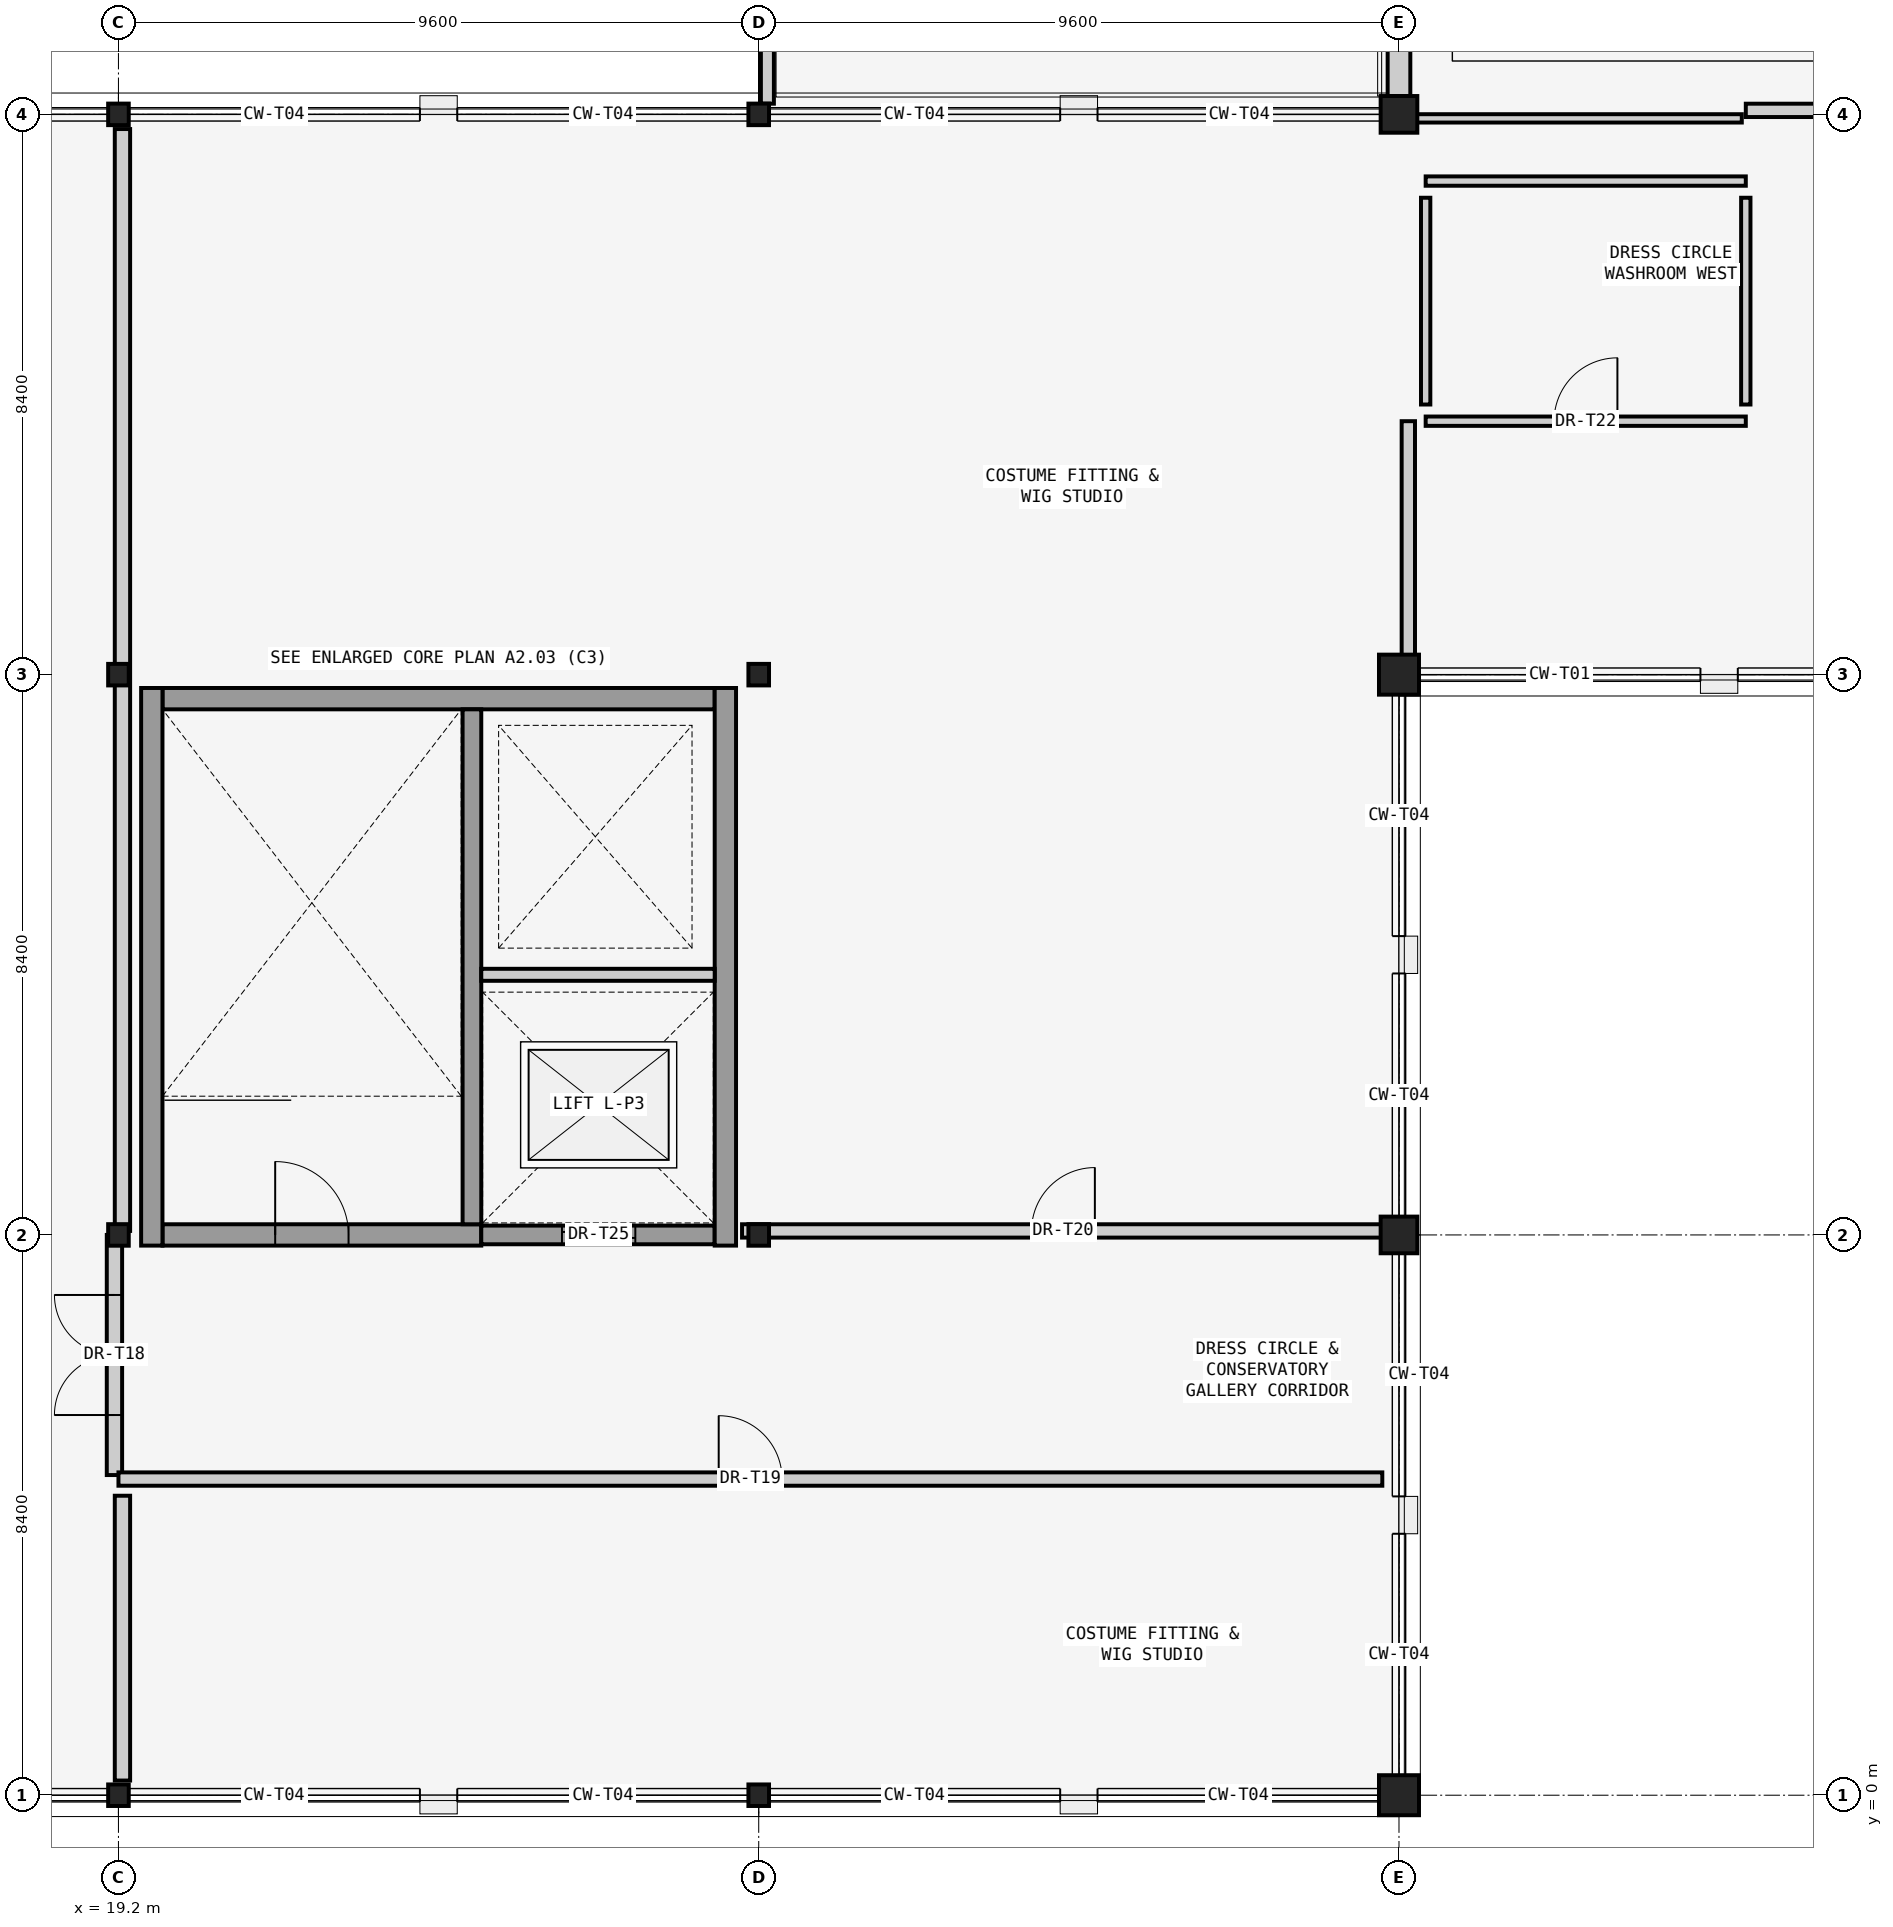
"""IFC4 building model, lengths in metres.
Left out: names, types, materials, properties, quantities, classifications, styles, units other than length and angle.
Written with IfcOpenShell. Run it as: python <this file> out.ifc"""

import sys

from ifc_helpers import new_model, si_unit, direction, frame, frame_2d, origin, origin_2d, place, context, subcontext, project, spatial, rectangle, i_section, extrude, element, fill, save


model = new_model("IFC4")
c1 = context("Model", 3, precision=1e-05, world=origin(), true_north=direction((0.0, 1.0)))
c2 = subcontext(c1, "Body", "Model", "MODEL_VIEW")
j1 = project(units=[si_unit("LENGTHUNIT", "METRE"), si_unit("PLANEANGLEUNIT", "RADIAN")], contexts=[c1])
p1 = place(None, origin())
s1 = spatial("IfcSite", under=j1, at=p1, CompositionType="ELEMENT")
p2 = place(p1, origin())
s2 = spatial("IfcBuilding", under=s1, at=p2, CompositionType="ELEMENT")
p3 = place(p2, frame((0.0, 0.0, 10.2)))
s3 = spatial("IfcBuildingStorey", under=s2, at=p3, CompositionType="ELEMENT", Elevation=10.2)
for number, where, z_axis, x_axis in (
    (1, (19.2, 0.0, 0.0), (0.0, 0.0, 1.0), (1.0, 0.0, 0.0)),
    (2, (19.2, 8.4, 0.0), (0.0, 0.0, 1.0), (1.0, 0.0, 0.0)),
):
    element("IfcColumn", number, at=place(p3, frame(where, z_axis=z_axis, x_axis=x_axis)), inside=s3, PredefinedType="COLUMN", context=c2, shape_type="SweptSolid", body=[
        extrude(i_section(OverallWidth=0.309, OverallDepth=0.323, WebThickness=0.014, FlangeThickness=0.023, at=origin_2d()), origin(), (0.0, 0.0, 1.0), 4.62),
    ])
for number, where, z_axis, x_axis in (
    (3, (19.2, 16.8, 0.0), (0.0, 0.0, 1.0), (1.0, 0.0, 0.0)),
    (4, (19.2, 25.2, 0.0), (0.0, 0.0, 1.0), (1.0, 0.0, 0.0)),
):
    element("IfcColumn", number, at=place(p3, frame(where, z_axis=z_axis, x_axis=x_axis)), inside=s3, PredefinedType="COLUMN", context=c2, shape_type="SweptSolid", body=[
        extrude(i_section(OverallWidth=0.309, OverallDepth=0.323, WebThickness=0.014, FlangeThickness=0.023, at=origin_2d()), origin(), (0.0, 0.0, 1.0), 4.53),
    ])
for number, where, z_axis, x_axis in (
    (5, (28.8, 0.0, 0.0), (0.0, 0.0, 1.0), (1.0, 0.0, 0.0)),
    (6, (28.8, 8.4, 0.0), (0.0, 0.0, 1.0), (1.0, 0.0, 0.0)),
):
    element("IfcColumn", number, at=place(p3, frame(where, z_axis=z_axis, x_axis=x_axis)), inside=s3, PredefinedType="COLUMN", context=c2, shape_type="SweptSolid", body=[
        extrude(i_section(OverallWidth=0.309, OverallDepth=0.323, WebThickness=0.014, FlangeThickness=0.023, at=origin_2d()), origin(), (0.0, 0.0, 1.0), 4.62),
    ])
for number, where, z_axis, x_axis in (
    (7, (28.8, 16.8, 0.0), (0.0, 0.0, 1.0), (1.0, 0.0, 0.0)),
    (8, (28.8, 25.2, 0.0), (0.0, 0.0, 1.0), (1.0, 0.0, 0.0)),
):
    element("IfcColumn", number, at=place(p3, frame(where, z_axis=z_axis, x_axis=x_axis)), inside=s3, PredefinedType="COLUMN", context=c2, shape_type="SweptSolid", body=[
        extrude(i_section(OverallWidth=0.309, OverallDepth=0.323, WebThickness=0.014, FlangeThickness=0.023, at=origin_2d()), origin(), (0.0, 0.0, 1.0), 4.53),
    ])
p4 = place(p3, frame((38.4, 0.0, 0.0), z_axis=(0.0, 0.0, 1.0), x_axis=(1.0, 0.0, 0.0)))
e9 = element("IfcColumn", 9, at=p4, inside=s3, PredefinedType="COLUMN", context=c2, shape_type="SweptSolid", body=[
    extrude(rectangle(XDim=0.6, YDim=0.6, at=origin_2d()), origin(), (0.0, 0.0, 1.0), 4.62),
])
p5 = place(p3, frame((38.4, 8.4, 0.0), z_axis=(0.0, 0.0, 1.0), x_axis=(1.0, 0.0, 0.0)))
e10 = element("IfcColumn", 10, at=p5, inside=s3, PredefinedType="COLUMN", context=c2, shape_type="SweptSolid", body=[
    extrude(rectangle(XDim=0.55, YDim=0.55, at=origin_2d()), origin(), (0.0, 0.0, 1.0), 4.62),
])
p6 = place(p3, frame((38.4, 16.8, 0.0), z_axis=(0.0, 0.0, 1.0), x_axis=(1.0, 0.0, 0.0)))
e11 = element("IfcColumn", 11, at=p6, inside=s3, PredefinedType="COLUMN", context=c2, shape_type="SweptSolid", body=[
    extrude(rectangle(XDim=0.6, YDim=0.6, at=origin_2d()), origin(), (0.0, 0.0, 1.0), 4.53),
])
p7 = place(p3, frame((38.4, 25.2, 0.0), z_axis=(0.0, 0.0, 1.0), x_axis=(1.0, 0.0, 0.0)))
e12 = element("IfcColumn", 12, at=p7, inside=s3, PredefinedType="COLUMN", context=c2, shape_type="SweptSolid", body=[
    extrude(rectangle(XDim=0.55, YDim=0.55, at=origin_2d()), origin(), (0.0, 0.0, 1.0), 4.53),
])
p8 = place(p3, frame((38.4, 25.475, 0.0), z_axis=(0.0, 0.0, 1.0), x_axis=(0.0, 1.0, 0.0)))
e13 = element("IfcWall", 13, at=p8, inside=s3, PredefinedType="SOLIDWALL", context=c2, shape_type="SweptSolid", body=[
    extrude(rectangle(XDim=7.825, YDim=0.34, at=frame_2d((3.913, 0.0))), origin(), (0.0, 0.0, 1.0), 4.54),
])
p9 = place(p8, frame((1.216, 0.0, 0.85)))
e14 = element("IfcOpeningElement", 14, at=p9, cuts=e13, PredefinedType="OPENING", context=c2, shape_type="SweptSolid", body=[
    extrude(rectangle(XDim=1.95, YDim=2.5, at=frame_2d((0.975, 1.25))), frame((0.0, 0.18, 0.0), z_axis=(0.0, -1.0, 0.0), x_axis=(1.0, 0.0, 0.0)), (0.0, 0.0, 1.0), 0.36),
])
p10 = place(p3, frame((28.93, 25.36, 0.0), z_axis=(0.0, 0.0, 1.0), x_axis=(0.0, 1.0, 0.0)))
e15 = element("IfcWall", 15, at=p10, inside=s3, PredefinedType="PARAPET", context=c2, shape_type="SweptSolid", body=[
    extrude(rectangle(XDim=8.08, YDim=0.195, at=frame_2d((4.04, 0.0))), origin(), (0.0, 0.0, 1.0), 1.15),
])
p11 = place(p3, frame((19.86, 8.4, 0.0), z_axis=(0.0, 0.0, 1.0), x_axis=(1.0, 0.0, 0.0)))
e16 = element("IfcWall", 16, at=p11, inside=s3, PredefinedType="SHEAR", context=c2, shape_type="SweptSolid", body=[
    extrude(rectangle(XDim=4.78, YDim=0.32, at=frame_2d((2.39, 0.0))), origin(), (0.0, 0.0, 1.0), 4.54),
])
p12 = place(p11, frame((1.69, 0.0, 0.0)))
e17 = element("IfcOpeningElement", 17, at=p12, cuts=e16, PredefinedType="OPENING", context=c2, shape_type="SweptSolid", body=[
    extrude(rectangle(XDim=1.1, YDim=2.2, at=frame_2d((0.55, 1.1))), frame((0.0, 0.17, 0.0), z_axis=(0.0, -1.0, 0.0), x_axis=(1.0, 0.0, 0.0)), (0.0, 0.0, 1.0), 0.34),
])
p13 = place(p3, frame((24.64, 8.4, 0.0), z_axis=(0.0, 0.0, 1.0), x_axis=(1.0, 0.0, 0.0)))
e18 = element("IfcWall", 18, at=p13, inside=s3, PredefinedType="SHEAR", context=c2, shape_type="SweptSolid", body=[
    extrude(rectangle(XDim=3.5, YDim=0.28, at=frame_2d((1.75, 0.0))), origin(), (0.0, 0.0, 1.0), 4.54),
])
p14 = place(p13, frame((1.21, 0.0, 0.0)))
e19 = element("IfcOpeningElement", 19, at=p14, cuts=e18, PredefinedType="OPENING", context=c2, shape_type="SweptSolid", body=[
    extrude(rectangle(XDim=1.1, YDim=2.2, at=frame_2d((0.55, 1.1))), frame((0.0, 0.15, 0.0), z_axis=(0.0, -1.0, 0.0), x_axis=(1.0, 0.0, 0.0)), (0.0, 0.0, 1.0), 0.3),
])
p15 = place(p3, frame((28.14, 16.44, 0.0), z_axis=(0.0, 0.0, 1.0), x_axis=(-1.0, 0.0, 0.0)))
e20 = element("IfcWall", 20, at=p15, inside=s3, PredefinedType="SHEAR", context=c2, shape_type="SweptSolid", body=[
    extrude(rectangle(XDim=8.28, YDim=0.32, at=frame_2d((4.14, 0.0))), origin(), (0.0, 0.0, 1.0), 4.54),
])
for number, where, z_axis, x_axis in (
    (21, (19.7, 16.6, 0.0), (0.0, 0.0, 1.0), (0.0, -1.0, 0.0)),
    (22, (28.3, 8.24, 0.0), (0.0, 0.0, 1.0), (0.0, 1.0, 0.0)),
):
    element("IfcWall", number, at=place(p3, frame(where, z_axis=z_axis, x_axis=x_axis)), inside=s3, PredefinedType="SHEAR", context=c2, shape_type="SweptSolid", body=[
        extrude(rectangle(XDim=8.36, YDim=0.32, at=frame_2d((4.18, 0.0))), origin(), (0.0, 0.0, 1.0), 4.54),
    ])
p16 = place(p3, frame((24.5, 8.56, 0.0), z_axis=(0.0, 0.0, 1.0), x_axis=(0.0, 1.0, 0.0)))
e23 = element("IfcWall", 23, at=p16, inside=s3, PredefinedType="SHEAR", context=c2, shape_type="SweptSolid", body=[
    extrude(rectangle(XDim=7.72, YDim=0.28, at=frame_2d((3.86, 0.0))), origin(), (0.0, 0.0, 1.0), 4.54),
])
p17 = place(p3, frame((24.64, 12.3, 0.0), z_axis=(0.0, 0.0, 1.0), x_axis=(1.0, 0.0, 0.0)))
e24 = element("IfcWall", 24, at=p17, inside=s3, PredefinedType="SOLIDWALL", context=c2, shape_type="SweptSolid", body=[
    extrude(rectangle(XDim=3.5, YDim=0.18, at=frame_2d((1.75, 0.0))), origin(), (0.0, 0.0, 1.0), 4.54),
])
p18 = place(p3, frame((38.8, 20.6, 0.0), z_axis=(0.0, 0.0, 1.0), x_axis=(1.0, 0.0, 0.0)))
e25 = element("IfcWall", 25, at=p18, inside=s3, PredefinedType="PARTITIONING", context=c2, shape_type="SweptSolid", body=[
    extrude(rectangle(XDim=4.8, YDim=0.14, at=frame_2d((2.4, 0.0))), origin(), (0.0, 0.0, 1.0), 4.32),
])
p19 = place(p18, frame((1.925, 0.0, 0.0)))
e26 = element("IfcOpeningElement", 26, at=p19, cuts=e25, PredefinedType="OPENING", context=c2, shape_type="SweptSolid", body=[
    extrude(rectangle(XDim=0.95, YDim=2.15, at=frame_2d((0.475, 1.075))), frame((0.0, 0.08, 0.0), z_axis=(0.0, -1.0, 0.0), x_axis=(1.0, 0.0, 0.0)), (0.0, 0.0, 1.0), 0.16),
])
p20 = place(p3, frame((38.8, 24.2, 0.0), z_axis=(0.0, 0.0, 1.0), x_axis=(1.0, 0.0, 0.0)))
e27 = element("IfcWall", 27, at=p20, inside=s3, PredefinedType="PARTITIONING", context=c2, shape_type="SweptSolid", body=[
    extrude(rectangle(XDim=4.8, YDim=0.14, at=frame_2d((2.4, 0.0))), origin(), (0.0, 0.0, 1.0), 4.32),
])
for number, where, z_axis, x_axis in (
    (28, (38.8, 20.85, 0.0), (0.0, 0.0, 1.0), (0.0, 1.0, 0.0)),
    (29, (43.6, 20.85, 0.0), (0.0, 0.0, 1.0), (0.0, 1.0, 0.0)),
):
    element("IfcWall", number, at=place(p3, frame(where, z_axis=z_axis, x_axis=x_axis)), inside=s3, PredefinedType="PARTITIONING", context=c2, shape_type="SweptSolid", body=[
        extrude(rectangle(XDim=3.1, YDim=0.14, at=frame_2d((1.55, 0.0))), origin(), (0.0, 0.0, 1.0), 4.32),
    ])
p21 = place(p3, frame((19.14, 4.8, 0.0), z_axis=(0.0, 0.0, 1.0), x_axis=(0.0, 1.0, 0.0)))
e30 = element("IfcWall", 30, at=p21, inside=s3, PredefinedType="SOLIDWALL", context=c2, shape_type="SweptSolid", body=[
    extrude(rectangle(XDim=3.6, YDim=0.23, at=frame_2d((1.8, 0.0))), origin(), (0.0, 0.0, 1.0), 4.3),
])
p22 = place(p21, frame((0.9, 0.0, 0.0)))
e31 = element("IfcOpeningElement", 31, at=p22, cuts=e30, PredefinedType="OPENING", context=c2, shape_type="SweptSolid", body=[
    extrude(rectangle(XDim=1.8, YDim=2.4, at=frame_2d((0.9, 1.2))), frame((0.0, 0.125, 0.0), z_axis=(0.0, -1.0, 0.0), x_axis=(1.0, 0.0, 0.0)), (0.0, 0.0, 1.0), 0.25),
])
p23 = place(p3, frame((28.55, 8.46, 0.0), z_axis=(0.0, 0.0, 1.0), x_axis=(1.0, 0.0, 0.0)))
e32 = element("IfcWall", 32, at=p23, inside=s3, PredefinedType="SOLIDWALL", context=c2, shape_type="SweptSolid", body=[
    extrude(rectangle(XDim=9.63, YDim=0.2, at=frame_2d((4.815, 0.0))), origin(), (0.0, 0.0, 1.0), 4.3),
])
p24 = place(p23, frame((4.34, 0.0, 0.0)))
e33 = element("IfcOpeningElement", 33, at=p24, cuts=e32, PredefinedType="OPENING", context=c2, shape_type="SweptSolid", body=[
    extrude(rectangle(XDim=0.95, YDim=2.15, at=frame_2d((0.475, 1.075))), frame((0.0, 0.11, 0.0), z_axis=(0.0, -1.0, 0.0), x_axis=(1.0, 0.0, 0.0)), (0.0, 0.0, 1.0), 0.22),
])
p25 = place(p3, frame((19.2, 4.74, 0.0), z_axis=(0.0, 0.0, 1.0), x_axis=(1.0, 0.0, 0.0)))
e34 = element("IfcWall", 34, at=p25, inside=s3, PredefinedType="SOLIDWALL", context=c2, shape_type="SweptSolid", body=[
    extrude(rectangle(XDim=18.95, YDim=0.2, at=frame_2d((9.475, 0.0))), origin(), (0.0, 0.0, 1.0), 4.3),
])
p26 = place(p25, frame((9.0, 0.0, 0.0)))
e35 = element("IfcOpeningElement", 35, at=p26, cuts=e34, PredefinedType="OPENING", context=c2, shape_type="SweptSolid", body=[
    extrude(rectangle(XDim=0.95, YDim=2.15, at=frame_2d((0.475, 1.075))), frame((0.0, 0.11, 0.0), z_axis=(0.0, -1.0, 0.0), x_axis=(1.0, 0.0, 0.0)), (0.0, 0.0, 1.0), 0.22),
])
p27 = place(p3, frame((43.6, 25.26, 0.0), z_axis=(0.0, 0.0, 1.0), x_axis=(1.0, 0.0, 0.0)))
e36 = element("IfcWall", 36, at=p27, inside=s3, PredefinedType="SOLIDWALL", context=c2, shape_type="SweptSolid", body=[
    extrude(rectangle(XDim=4.65, YDim=0.2, at=frame_2d((2.325, 0.0))), origin(), (0.0, 0.0, 1.0), 3.649),
])
p28 = place(p27, frame((1.85, 0.0, 0.0)))
e37 = element("IfcOpeningElement", 37, at=p28, cuts=e36, PredefinedType="OPENING", context=c2, shape_type="SweptSolid", body=[
    extrude(rectangle(XDim=0.95, YDim=2.15, at=frame_2d((0.475, 1.075))), frame((0.0, 0.11, 0.0), z_axis=(0.0, -1.0, 0.0), x_axis=(1.0, 0.0, 0.0)), (0.0, 0.0, 1.0), 0.22),
])
p29 = place(p3, frame((38.54, 17.02, 0.0), z_axis=(0.0, 0.0, 1.0), x_axis=(0.0, 1.0, 0.0)))
e38 = element("IfcWall", 38, at=p29, inside=s3, PredefinedType="SOLIDWALL", context=c2, shape_type="SweptSolid", body=[
    extrude(rectangle(XDim=3.58, YDim=0.2, at=frame_2d((1.79, 0.0))), origin(), (0.0, 0.0, 1.0), 4.48),
])
p30 = place(p3, frame((38.62, 25.14, 0.0), z_axis=(0.0, 0.0, 1.0), x_axis=(1.0, 0.0, 0.0)))
e39 = element("IfcWall", 39, at=p30, inside=s3, PredefinedType="PARTITIONING", context=c2, shape_type="SweptSolid", body=[
    extrude(rectangle(XDim=4.92, YDim=0.125, at=frame_2d((2.46, 0.0))), origin(), (0.0, 0.0, 1.0), 3.649),
])
p31 = place(p3, frame((19.26, 8.46, 0.0), z_axis=(0.0, 0.0, 1.0), x_axis=(0.0, 1.0, 0.0)))
e40 = element("IfcWall", 40, at=p31, inside=s3, PredefinedType="SOLIDWALL", context=c2, shape_type="SweptSolid", body=[
    extrude(rectangle(XDim=16.52, YDim=0.23, at=frame_2d((8.26, 0.0))), origin(), (0.0, 0.0, 1.0), 3.807),
])
p32 = place(p3, frame((19.26, 0.22, 0.0), z_axis=(0.0, 0.0, 1.0), x_axis=(0.0, 1.0, 0.0)))
e41 = element("IfcWall", 41, at=p32, inside=s3, PredefinedType="SOLIDWALL", context=c2, shape_type="SweptSolid", body=[
    extrude(rectangle(XDim=4.27, YDim=0.23, at=frame_2d((2.135, 0.0))), origin(), (0.0, 0.0, 1.0), 4.3),
])
p33 = place(p12, origin())
e42 = element("IfcDoor", 42, at=p33, inside=s3, OperationType="SINGLE_SWING_LEFT", PredefinedType="DOOR", context=c2, shape_type="SweptSolid", body=[
    extrude(rectangle(XDim=1.1, YDim=2.2, at=frame_2d((0.55, 1.1))), frame((0.0, 0.025, 0.0), z_axis=(0.0, -1.0, 0.0), x_axis=(1.0, 0.0, 0.0)), (0.0, 0.0, 1.0), 0.05),
])
fill(e17, e42)
p34 = place(p14, origin())
e43 = element("IfcDoor", 43, at=p34, inside=s3, OperationType="SLIDING_TO_LEFT", PredefinedType="DOOR", context=c2, shape_type="SweptSolid", body=[
    extrude(rectangle(XDim=1.1, YDim=2.2, at=frame_2d((0.55, 1.1))), frame((0.0, 0.025, 0.0), z_axis=(0.0, -1.0, 0.0), x_axis=(1.0, 0.0, 0.0)), (0.0, 0.0, 1.0), 0.05),
])
fill(e19, e43)
p35 = place(p19, origin())
e44 = element("IfcDoor", 44, at=p35, inside=s3, OperationType="SINGLE_SWING_RIGHT", PredefinedType="DOOR", context=c2, shape_type="SweptSolid", body=[
    extrude(rectangle(XDim=0.95, YDim=2.15, at=frame_2d((0.475, 1.075))), frame((0.0, 0.025, 0.0), z_axis=(0.0, -1.0, 0.0), x_axis=(1.0, 0.0, 0.0)), (0.0, 0.0, 1.0), 0.05),
])
fill(e26, e44)
p36 = place(p22, origin())
e45 = element("IfcDoor", 45, at=p36, inside=s3, OperationType="DOUBLE_SWING_LEFT", PredefinedType="DOOR", context=c2, shape_type="SweptSolid", body=[
    extrude(rectangle(XDim=1.8, YDim=2.4, at=frame_2d((0.9, 1.2))), frame((0.0, 0.025, 0.0), z_axis=(0.0, -1.0, 0.0), x_axis=(1.0, 0.0, 0.0)), (0.0, 0.0, 1.0), 0.05),
])
fill(e31, e45)
p37 = place(p24, origin())
e46 = element("IfcDoor", 46, at=p37, inside=s3, OperationType="SINGLE_SWING_RIGHT", PredefinedType="DOOR", context=c2, shape_type="SweptSolid", body=[
    extrude(rectangle(XDim=0.95, YDim=2.15, at=frame_2d((0.475, 1.075))), frame((0.0, 0.025, 0.0), z_axis=(0.0, -1.0, 0.0), x_axis=(1.0, 0.0, 0.0)), (0.0, 0.0, 1.0), 0.05),
])
fill(e33, e46)
p38 = place(p26, origin())
e47 = element("IfcDoor", 47, at=p38, inside=s3, OperationType="SINGLE_SWING_LEFT", PredefinedType="DOOR", context=c2, shape_type="SweptSolid", body=[
    extrude(rectangle(XDim=0.95, YDim=2.15, at=frame_2d((0.475, 1.075))), frame((0.0, 0.025, 0.0), z_axis=(0.0, -1.0, 0.0), x_axis=(1.0, 0.0, 0.0)), (0.0, 0.0, 1.0), 0.05),
])
fill(e35, e47)
save(model, sys.argv[1])
